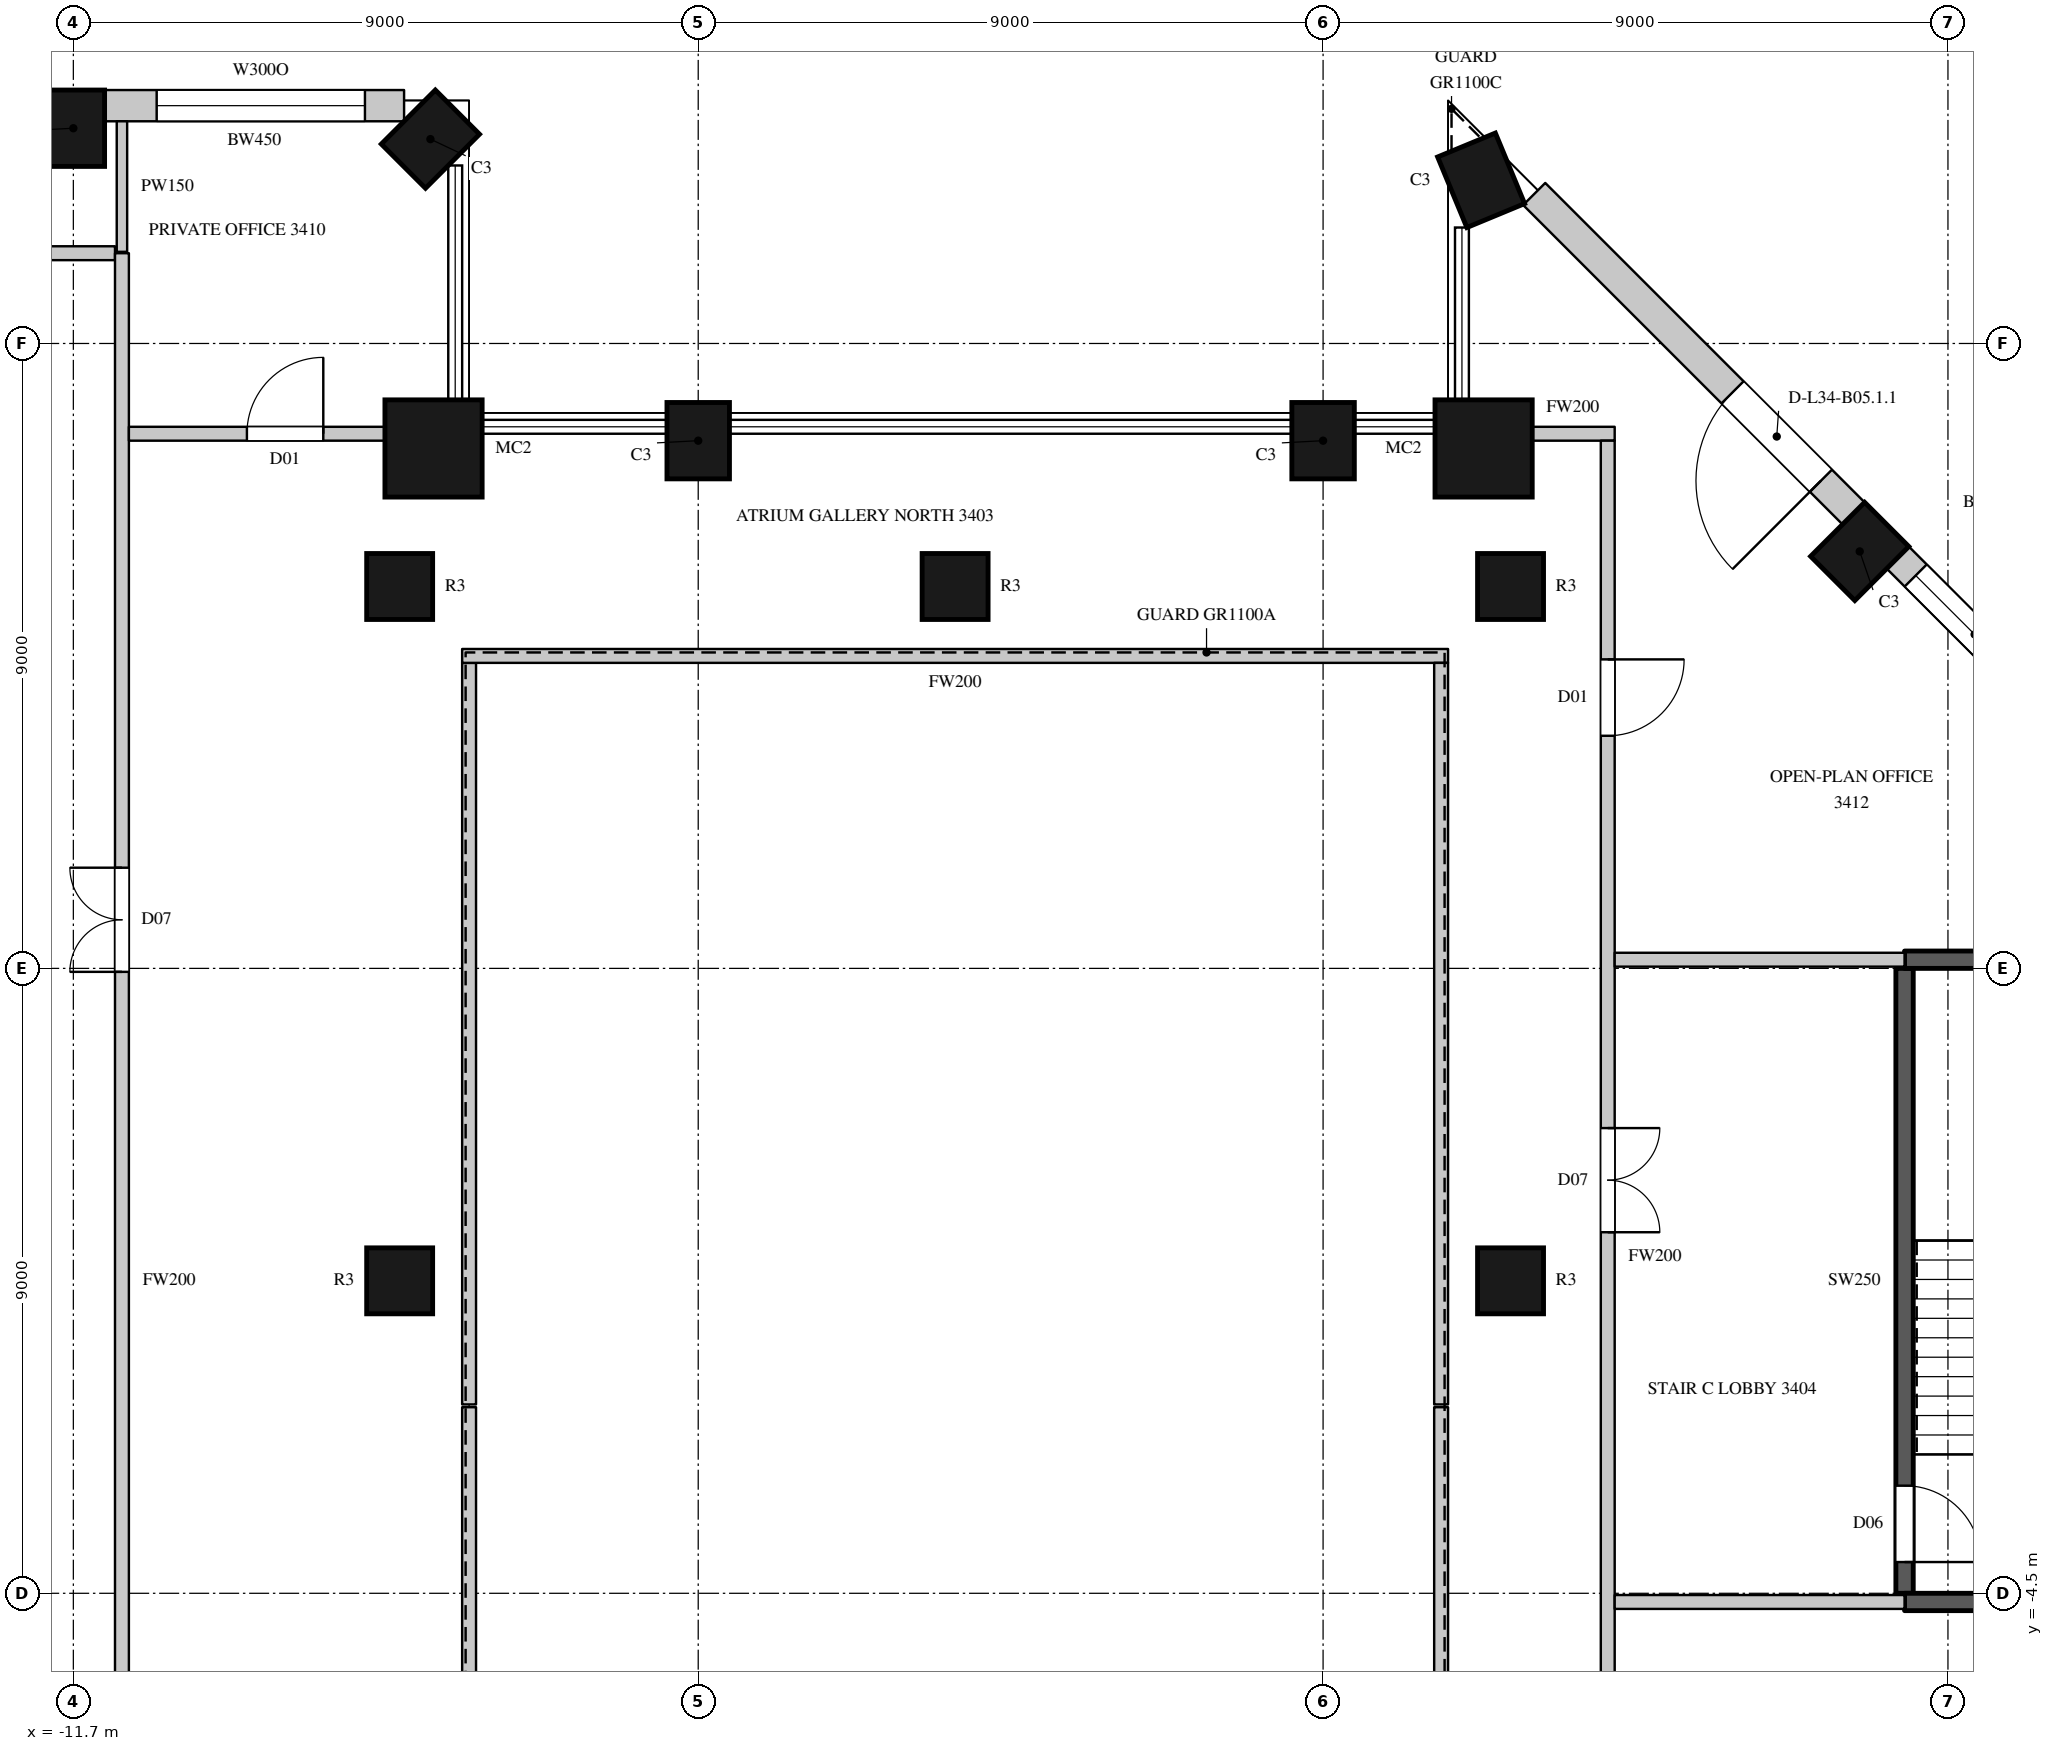
"""IFC4 building model, lengths in metres.
Left out: names, types, materials, properties, quantities, classifications, styles, units other than length and angle.
Written with IfcOpenShell. Run it as: python <this file> out.ifc"""

import sys

from ifc_helpers import new_model, si_unit, direction, frame, frame_2d, origin, origin_2d, place, context, subcontext, project, spatial, rectangle, circle, extrude, element, fill, save


model = new_model("IFC4")
c1 = context("Model", 3, precision=1e-05, world=origin(), true_north=direction((0.0, 1.0)))
c2 = subcontext(c1, "Body", "Model", "MODEL_VIEW")
j1 = project(units=[si_unit("LENGTHUNIT", "METRE"), si_unit("PLANEANGLEUNIT", "RADIAN")], contexts=[c1])
p1 = place(None, origin())
s1 = spatial("IfcSite", under=j1, at=p1, CompositionType="ELEMENT")
p2 = place(p1, origin())
s2 = spatial("IfcBuilding", under=s1, at=p2, CompositionType="ELEMENT")
p3 = place(p2, frame((0.0, 0.0, 160.5)))
s3 = spatial("IfcBuildingStorey", under=s2, at=p3, CompositionType="ELEMENT", Elevation=160.5)
for number, where, z_axis, x_axis in (
    (1, (14.029, 10.505, 0.0), (0.0, 0.0, 1.0), (-0.707, 0.707, 0.0)),
    (2, (8.576, 15.85, 0.0), (0.0, 0.0, 1.0), (-0.924, -0.383, 0.0)),
):
    element("IfcColumn", number, at=place(p3, frame(where, z_axis=z_axis, x_axis=x_axis)), inside=s3, PredefinedType="COLUMN", context=c2, shape_type="SweptSolid", body=[
        extrude(rectangle(XDim=0.9, YDim=1.1, at=origin_2d()), origin(), (0.0, 0.0, 1.0), 4.1),
    ])
p4 = place(p3, frame((8.612, 11.988, 0.0), z_axis=(0.0, 0.0, 1.0), x_axis=(1.0, 0.0, 0.0)))
e3 = element("IfcColumn", 3, at=p4, inside=s3, PredefinedType="COLUMN", context=c2, shape_type="SweptSolid", body=[
    extrude(circle(Radius=0.7, at=origin_2d()), origin(), (0.0, 0.0, 1.0), 4.1),
])
for number, where, z_axis, x_axis in (
    (4, (6.3, 12.1, 0.0), (0.0, 0.0, 1.0), (-1.0, 0.0, 0.0)),
    (5, (-2.7, 12.1, 0.0), (0.0, 0.0, 1.0), (-1.0, 0.0, 0.0)),
):
    element("IfcColumn", number, at=place(p3, frame(where, z_axis=z_axis, x_axis=x_axis)), inside=s3, PredefinedType="COLUMN", context=c2, shape_type="SweptSolid", body=[
        extrude(rectangle(XDim=0.9, YDim=1.1, at=origin_2d()), origin(), (0.0, 0.0, 1.0), 4.1),
    ])
p5 = place(p3, frame((-6.512, 11.988, 0.0), z_axis=(0.0, 0.0, 1.0), x_axis=(1.0, 0.0, 0.0)))
e6 = element("IfcColumn", 6, at=p5, inside=s3, PredefinedType="COLUMN", context=c2, shape_type="SweptSolid", body=[
    extrude(circle(Radius=0.7, at=origin_2d()), origin(), (0.0, 0.0, 1.0), 4.1),
])
for number, where, z_axis, x_axis in (
    (7, (-6.557, 16.443, 0.0), (0.0, 0.0, 1.0), (-0.707, 0.707, 0.0)),
    (8, (-11.7, 16.6, 0.0), (0.0, 0.0, 1.0), (-1.0, 0.0, 0.0)),
):
    element("IfcColumn", number, at=place(p3, frame(where, z_axis=z_axis, x_axis=x_axis)), inside=s3, PredefinedType="COLUMN", context=c2, shape_type="SweptSolid", body=[
        extrude(rectangle(XDim=0.9, YDim=1.1, at=origin_2d()), origin(), (0.0, 0.0, 1.0), 4.1),
    ])
for number, where, z_axis, x_axis in (
    (9, (-7.0, 0.0, 0.0), (0.0, 0.0, 1.0), (1.0, 0.0, 0.0)),
    (10, (-7.0, 10.0, 0.0), (0.0, 0.0, 1.0), (1.0, 0.0, 0.0)),
    (11, (1.0, 10.0, 0.0), (0.0, 0.0, 1.0), (1.0, 0.0, 0.0)),
    (12, (9.0, 0.0, 0.0), (0.0, 0.0, 1.0), (1.0, 0.0, 0.0)),
    (13, (9.0, 10.0, 0.0), (0.0, 0.0, 1.0), (1.0, 0.0, 0.0)),
):
    element("IfcColumn", number, at=place(p3, frame(where, z_axis=z_axis, x_axis=x_axis)), inside=s3, PredefinedType="COLUMN", context=c2, shape_type="SweptSolid", body=[
        extrude(circle(Radius=0.475, at=origin_2d()), origin(), (0.0, 0.0, 1.0), 4.1),
    ])
p6 = place(p3, frame((19.615, 5.379, 0.0), z_axis=(0.0, 0.0, 1.0), x_axis=(-0.707089646058, 0.7071239159, 0.0)))
e14 = element("IfcWall", 14, at=p6, inside=s3, PredefinedType="SOLIDWALL", context=c2, shape_type="SweptSolid", body=[
    extrude(rectangle(XDim=7.124, YDim=0.45, at=frame_2d((3.562, 0.0))), origin(), (0.0, 0.0, 1.0), 3.8),
])
p7 = place(p6, frame((0.328, 0.0, 1.05)))
e15 = element("IfcOpeningElement", 15, at=p7, cuts=e14, PredefinedType="OPENING", context=c2, shape_type="SweptSolid", body=[
    extrude(rectangle(XDim=2.4, YDim=2.4, at=frame_2d((1.2, 1.2))), frame((0.0, 0.235, 0.0), z_axis=(0.0, -1.0, 0.0), x_axis=(1.0, 0.0, 0.0)), (0.0, 0.0, 1.0), 0.47),
])
p8 = place(p6, frame((4.359, 0.0, 1.05)))
e16 = element("IfcOpeningElement", 16, at=p8, cuts=e14, PredefinedType="OPENING", context=c2, shape_type="SweptSolid", body=[
    extrude(rectangle(XDim=2.4, YDim=2.4, at=frame_2d((1.2, 1.2))), frame((0.0, 0.235, 0.0), z_axis=(0.0, -1.0, 0.0), x_axis=(1.0, 0.0, 0.0)), (0.0, 0.0, 1.0), 0.47),
])
p9 = place(p3, frame((13.941, 11.053, 0.0), z_axis=(0.0, 0.0, 1.0), x_axis=(-0.707106781187, 0.707106781187, 0.0)))
e17 = element("IfcWall", 17, at=p9, inside=s3, PredefinedType="SOLIDWALL", context=c2, shape_type="SweptSolid", body=[
    extrude(rectangle(XDim=6.505, YDim=0.45, at=frame_2d((3.252, 0.0))), origin(), (0.0, 0.0, 1.0), 3.8),
])
p10 = place(p9, frame((0.665, 0.0, 0.0)))
e18 = element("IfcOpeningElement", 18, at=p10, cuts=e17, PredefinedType="OPENING", context=c2, shape_type="SweptSolid", body=[
    extrude(rectangle(XDim=1.8, YDim=2.4, at=frame_2d((0.9, 1.2))), frame((0.0, 0.235, 0.0), z_axis=(0.0, -1.0, 0.0), x_axis=(1.0, 0.0, 0.0)), (0.0, 0.0, 1.0), 0.47),
])
p11 = place(p3, frame((-6.936, 16.925, 0.0), z_axis=(0.0, 0.0, 1.0), x_axis=(-1.0, 0.0, 0.0)))
e19 = element("IfcWall", 19, at=p11, inside=s3, PredefinedType="SOLIDWALL", context=c2, shape_type="SweptSolid", body=[
    extrude(rectangle(XDim=4.314, YDim=0.45, at=frame_2d((2.157, 0.0))), origin(), (0.0, 0.0, 1.0), 3.8),
])
p12 = place(p11, frame((0.564, 0.0, 1.05)))
e20 = element("IfcOpeningElement", 20, at=p12, cuts=e19, PredefinedType="OPENING", context=c2, shape_type="SweptSolid", body=[
    extrude(rectangle(XDim=3.0, YDim=2.4, at=frame_2d((1.5, 1.2))), frame((0.0, 0.235, 0.0), z_axis=(0.0, -1.0, 0.0), x_axis=(1.0, 0.0, 0.0)), (0.0, 0.0, 1.0), 0.47),
])
p13 = place(p3, frame((16.206, 10.308, 0.0), z_axis=(0.0, 0.0, 1.0), x_axis=(-0.707057827829, 0.707155731156, 0.0)))
e21 = element("IfcWall", 21, at=p13, inside=s3, PredefinedType="SOLIDWALL", context=c2, shape_type="SweptSolid", body=[
    extrude(rectangle(XDim=2.494, YDim=0.45, at=frame_2d((1.247, 0.0))), origin(), (0.0, 0.0, 1.0), 0.6),
])
p14 = place(p3, frame((12.251, 14.263, 0.0), z_axis=(0.0, 0.0, 1.0), x_axis=(-0.707039709166, 0.707173846846, 0.0)))
e22 = element("IfcWall", 22, at=p14, inside=s3, PredefinedType="SOLIDWALL", context=c2, shape_type="SweptSolid", body=[
    extrude(rectangle(XDim=1.82, YDim=0.45, at=frame_2d((0.91, 0.0))), origin(), (0.0, 0.0, 1.0), 0.6),
])
p15 = place(p3, frame((-13.97, 14.8, 0.0), z_axis=(0.0, 0.0, 1.0), x_axis=(1.0, 0.0, 0.0)))
e23 = element("IfcWall", 23, at=p15, inside=s3, PredefinedType="PARTITIONING", context=c2, shape_type="SweptSolid", body=[
    extrude(rectangle(XDim=2.87, YDim=0.2, at=frame_2d((1.435, 0.0))), origin(), (0.0, 0.0, 1.0), 3.8),
])
p16 = place(p3, frame((-11.0, -14.8, 0.0), z_axis=(0.0, 0.0, 1.0), x_axis=(0.0, 1.0, 0.0)))
e24 = element("IfcWall", 24, at=p16, inside=s3, PredefinedType="PARTITIONING", context=c2, shape_type="SweptSolid", body=[
    extrude(rectangle(XDim=29.6, YDim=0.2, at=frame_2d((14.8, 0.0))), origin(), (0.0, 0.0, 1.0), 3.8),
])
p17 = place(p16, frame((19.25, 0.0, 0.0)))
e25 = element("IfcOpeningElement", 25, at=p17, cuts=e24, PredefinedType="OPENING", context=c2, shape_type="SweptSolid", body=[
    extrude(rectangle(XDim=1.5, YDim=2.4, at=frame_2d((0.75, 1.2))), frame((0.0, 0.11, 0.0), z_axis=(0.0, -1.0, 0.0), x_axis=(1.0, 0.0, 0.0)), (0.0, 0.0, 1.0), 0.22),
])
p18 = place(p3, frame((-10.9, 12.2, 0.0), z_axis=(0.0, 0.0, 1.0), x_axis=(1.0, 0.0, 0.0)))
e26 = element("IfcWall", 26, at=p18, inside=s3, PredefinedType="PARTITIONING", context=c2, shape_type="SweptSolid", body=[
    extrude(rectangle(XDim=3.704, YDim=0.2, at=frame_2d((1.852, 0.0))), origin(), (0.0, 0.0, 1.0), 3.8),
])
p19 = place(p18, frame((1.7, 0.0, 0.0)))
e27 = element("IfcOpeningElement", 27, at=p19, cuts=e26, PredefinedType="OPENING", context=c2, shape_type="SweptSolid", body=[
    extrude(rectangle(XDim=1.1, YDim=2.4, at=frame_2d((0.55, 1.2))), frame((0.0, 0.11, 0.0), z_axis=(0.0, -1.0, 0.0), x_axis=(1.0, 0.0, 0.0)), (0.0, 0.0, 1.0), 0.22),
])
p20 = place(p3, frame((-6.0, -8.9, 0.0), z_axis=(0.0, 0.0, 1.0), x_axis=(0.0, 1.0, 0.0)))
e28 = element("IfcWall", 28, at=p20, inside=s3, PredefinedType="PARTITIONING", context=c2, shape_type="SweptSolid", body=[
    extrude(rectangle(XDim=7.08, YDim=0.2, at=frame_2d((3.54, 0.0))), origin(), (0.0, 0.0, 1.0), 3.8),
])
p21 = place(p3, frame((-6.0, -1.78, 0.0), z_axis=(0.0, 0.0, 1.0), x_axis=(0.0, 1.0, 0.0)))
e29 = element("IfcWall", 29, at=p21, inside=s3, PredefinedType="PARTITIONING", context=c2, shape_type="SweptSolid", body=[
    extrude(rectangle(XDim=10.68, YDim=0.2, at=frame_2d((5.34, 0.0))), origin(), (0.0, 0.0, 1.0), 3.8),
])
p22 = place(p3, frame((-6.1, 9.0, 0.0), z_axis=(0.0, 0.0, 1.0), x_axis=(1.0, 0.0, 0.0)))
e30 = element("IfcWall", 30, at=p22, inside=s3, PredefinedType="PARTITIONING", context=c2, shape_type="SweptSolid", body=[
    extrude(rectangle(XDim=14.2, YDim=0.2, at=frame_2d((7.1, 0.0))), origin(), (0.0, 0.0, 1.0), 3.8),
])
p23 = place(p3, frame((8.0, -8.9, 0.0), z_axis=(0.0, 0.0, 1.0), x_axis=(0.0, 1.0, 0.0)))
e31 = element("IfcWall", 31, at=p23, inside=s3, PredefinedType="PARTITIONING", context=c2, shape_type="SweptSolid", body=[
    extrude(rectangle(XDim=7.08, YDim=0.2, at=frame_2d((3.54, 0.0))), origin(), (0.0, 0.0, 1.0), 3.8),
])
p24 = place(p3, frame((8.0, -1.78, 0.0), z_axis=(0.0, 0.0, 1.0), x_axis=(0.0, 1.0, 0.0)))
e32 = element("IfcWall", 32, at=p24, inside=s3, PredefinedType="PARTITIONING", context=c2, shape_type="SweptSolid", body=[
    extrude(rectangle(XDim=10.68, YDim=0.2, at=frame_2d((5.34, 0.0))), origin(), (0.0, 0.0, 1.0), 3.8),
])
p25 = place(p3, frame((9.296, 12.2, 0.0), z_axis=(0.0, 0.0, 1.0), x_axis=(1.0, 0.0, 0.0)))
e33 = element("IfcWall", 33, at=p25, inside=s3, PredefinedType="PARTITIONING", context=c2, shape_type="SweptSolid", body=[
    extrude(rectangle(XDim=1.204, YDim=0.2, at=frame_2d((0.602, 0.0))), origin(), (0.0, 0.0, 1.0), 3.8),
])
p26 = place(p3, frame((10.4, -11.4, 0.0), z_axis=(0.0, 0.0, 1.0), x_axis=(0.0, 1.0, 0.0)))
e34 = element("IfcWall", 34, at=p26, inside=s3, PredefinedType="PARTITIONING", context=c2, shape_type="SweptSolid", body=[
    extrude(rectangle(XDim=23.5, YDim=0.2, at=frame_2d((11.75, 0.0))), origin(), (0.0, 0.0, 1.0), 3.8),
])
p27 = place(p26, frame((12.1, 0.0, 0.0)))
e35 = element("IfcOpeningElement", 35, at=p27, cuts=e34, PredefinedType="OPENING", context=c2, shape_type="SweptSolid", body=[
    extrude(rectangle(XDim=1.5, YDim=2.4, at=frame_2d((0.75, 1.2))), frame((0.0, 0.11, 0.0), z_axis=(0.0, -1.0, 0.0), x_axis=(1.0, 0.0, 0.0)), (0.0, 0.0, 1.0), 0.22),
])
p28 = place(p26, frame((19.25, 0.0, 0.0)))
e36 = element("IfcOpeningElement", 36, at=p28, cuts=e34, PredefinedType="OPENING", context=c2, shape_type="SweptSolid", body=[
    extrude(rectangle(XDim=1.1, YDim=2.4, at=frame_2d((0.55, 1.2))), frame((0.0, 0.11, 0.0), z_axis=(0.0, -1.0, 0.0), x_axis=(1.0, 0.0, 0.0)), (0.0, 0.0, 1.0), 0.22),
])
p29 = place(p26, frame((4.45, 0.0, 0.0)))
e37 = element("IfcOpeningElement", 37, at=p29, cuts=e34, PredefinedType="OPENING", context=c2, shape_type="SweptSolid", body=[
    extrude(rectangle(XDim=1.1, YDim=2.4, at=frame_2d((0.55, 1.2))), frame((0.0, 0.11, 0.0), z_axis=(0.0, -1.0, 0.0), x_axis=(1.0, 0.0, 0.0)), (0.0, 0.0, 1.0), 0.22),
])
for number, where, z_axis, x_axis in (
    (38, (10.5, -4.625, 0.0), (0.0, 0.0, 1.0), (1.0, 0.0, 0.0)),
    (39, (10.5, 4.625, 0.0), (0.0, 0.0, 1.0), (1.0, 0.0, 0.0)),
):
    element("IfcWall", number, at=place(p3, frame(where, z_axis=z_axis, x_axis=x_axis)), inside=s3, PredefinedType="PARTITIONING", context=c2, shape_type="SweptSolid", body=[
        extrude(rectangle(XDim=4.175, YDim=0.2, at=frame_2d((2.087, 0.0))), origin(), (0.0, 0.0, 1.0), 3.8),
    ])
p30 = place(p3, frame((-11.0, 14.82, 0.0), z_axis=(0.0, 0.0, 1.0), x_axis=(0.0, 1.0, 0.0)))
e40 = element("IfcWall", 40, at=p30, inside=s3, PredefinedType="PARTITIONING", context=c2, shape_type="SweptSolid", body=[
    extrude(rectangle(XDim=1.88, YDim=0.15, at=frame_2d((0.94, 0.0))), origin(), (0.0, 0.0, 1.0), 3.8),
])
p31 = place(p3, frame((14.675, -4.5, 0.0), z_axis=(0.0, 0.0, 1.0), x_axis=(0.0, 1.0, 0.0)))
e41 = element("IfcWall", 41, at=p31, inside=s3, PredefinedType="SHEAR", context=c2, shape_type="SweptSolid", body=[
    extrude(rectangle(XDim=9.0, YDim=0.25, at=frame_2d((4.5, 0.0))), origin(), (0.0, 0.0, 1.0), 3.8),
])
p32 = place(p31, frame((0.45, 0.0, 0.0)))
e42 = element("IfcOpeningElement", 42, at=p32, cuts=e41, PredefinedType="OPENING", context=c2, shape_type="SweptSolid", body=[
    extrude(rectangle(XDim=1.1, YDim=2.2, at=frame_2d((0.55, 1.1))), frame((0.0, 0.135, 0.0), z_axis=(0.0, -1.0, 0.0), x_axis=(1.0, 0.0, 0.0)), (0.0, 0.0, 1.0), 0.27),
])
p33 = place(p3, frame((14.675, -4.625, 0.0), z_axis=(0.0, 0.0, 1.0), x_axis=(1.0, 0.0, 0.0)))
e43 = element("IfcWall", 43, at=p33, inside=s3, PredefinedType="SHEAR", context=c2, shape_type="SweptSolid", body=[
    extrude(rectangle(XDim=4.45, YDim=0.25, at=frame_2d((2.225, 0.0))), origin(), (0.0, 0.0, 1.0), 3.8),
])
p34 = place(p3, frame((14.675, 4.625, 0.0), z_axis=(0.0, 0.0, 1.0), x_axis=(1.0, 0.0, 0.0)))
e44 = element("IfcWall", 44, at=p34, inside=s3, PredefinedType="SHEAR", context=c2, shape_type="SweptSolid", body=[
    extrude(rectangle(XDim=4.324, YDim=0.25, at=frame_2d((2.162, 0.0))), origin(), (0.0, 0.0, 1.0), 3.8),
])
p35 = place(p8, origin())
e45 = element("IfcWindow", 45, at=p35, inside=s3, PartitioningType="SINGLE_PANEL", PredefinedType="WINDOW", context=c2, shape_type="SweptSolid", body=[
    extrude(rectangle(XDim=2.4, YDim=2.4, at=frame_2d((1.2, 1.2))), frame((0.0, 0.135, 0.0), z_axis=(0.0, -1.0, 0.0), x_axis=(1.0, 0.0, 0.0)), (0.0, 0.0, 1.0), 0.06),
])
fill(e16, e45)
p36 = place(p10, origin())
e46 = element("IfcDoor", 46, at=p36, inside=s3, OperationType="SLIDING_TO_LEFT", PredefinedType="DOOR", context=c2, shape_type="SweptSolid", body=[
    extrude(rectangle(XDim=1.8, YDim=2.4, at=frame_2d((0.9, 1.2))), frame((0.0, 0.13, 0.0), z_axis=(0.0, -1.0, 0.0), x_axis=(1.0, 0.0, 0.0)), (0.0, 0.0, 1.0), 0.05),
])
fill(e18, e46)
p37 = place(p12, origin())
e47 = element("IfcWindow", 47, at=p37, inside=s3, PartitioningType="SINGLE_PANEL", PredefinedType="WINDOW", context=c2, shape_type="SweptSolid", body=[
    extrude(rectangle(XDim=3.0, YDim=2.4, at=frame_2d((1.5, 1.2))), frame((0.0, 0.135, 0.0), z_axis=(0.0, -1.0, 0.0), x_axis=(1.0, 0.0, 0.0)), (0.0, 0.0, 1.0), 0.06),
])
fill(e20, e47)
p38 = place(p17, origin())
e48 = element("IfcDoor", 48, at=p38, inside=s3, OperationType="DOUBLE_DOOR_SINGLE_SWING", PredefinedType="DOOR", context=c2, shape_type="SweptSolid", body=[
    extrude(rectangle(XDim=1.5, YDim=2.4, at=frame_2d((0.75, 1.2))), frame((0.0, 0.025, 0.0), z_axis=(0.0, -1.0, 0.0), x_axis=(1.0, 0.0, 0.0)), (0.0, 0.0, 1.0), 0.05),
])
fill(e25, e48)
p39 = place(p27, origin())
e49 = element("IfcDoor", 49, at=p39, inside=s3, OperationType="DOUBLE_DOOR_SINGLE_SWING", PredefinedType="DOOR", context=c2, shape_type="SweptSolid", body=[
    extrude(rectangle(XDim=1.5, YDim=2.4, at=frame_2d((0.75, 1.2))), frame((0.0, 0.025, 0.0), z_axis=(0.0, -1.0, 0.0), x_axis=(1.0, 0.0, 0.0)), (0.0, 0.0, 1.0), 0.05),
])
fill(e35, e49)
p40 = place(p19, origin())
e50 = element("IfcDoor", 50, at=p40, inside=s3, OperationType="SINGLE_SWING_RIGHT", PredefinedType="DOOR", context=c2, shape_type="SweptSolid", body=[
    extrude(rectangle(XDim=1.1, YDim=2.4, at=frame_2d((0.55, 1.2))), frame((0.0, 0.025, 0.0), z_axis=(0.0, -1.0, 0.0), x_axis=(1.0, 0.0, 0.0)), (0.0, 0.0, 1.0), 0.05),
])
fill(e27, e50)
p41 = place(p28, origin())
e51 = element("IfcDoor", 51, at=p41, inside=s3, OperationType="SINGLE_SWING_LEFT", PredefinedType="DOOR", context=c2, shape_type="SweptSolid", body=[
    extrude(rectangle(XDim=1.1, YDim=2.4, at=frame_2d((0.55, 1.2))), frame((0.0, 0.025, 0.0), z_axis=(0.0, -1.0, 0.0), x_axis=(1.0, 0.0, 0.0)), (0.0, 0.0, 1.0), 0.05),
])
fill(e36, e51)
p42 = place(p32, origin())
e52 = element("IfcDoor", 52, at=p42, inside=s3, OperationType="SINGLE_SWING_RIGHT", PredefinedType="DOOR", context=c2, shape_type="SweptSolid", body=[
    extrude(rectangle(XDim=1.1, YDim=2.2, at=frame_2d((0.55, 1.1))), frame((0.0, 0.025, 0.0), z_axis=(0.0, -1.0, 0.0), x_axis=(1.0, 0.0, 0.0)), (0.0, 0.0, 1.0), 0.05),
])
fill(e42, e52)
save(model, sys.argv[1])
